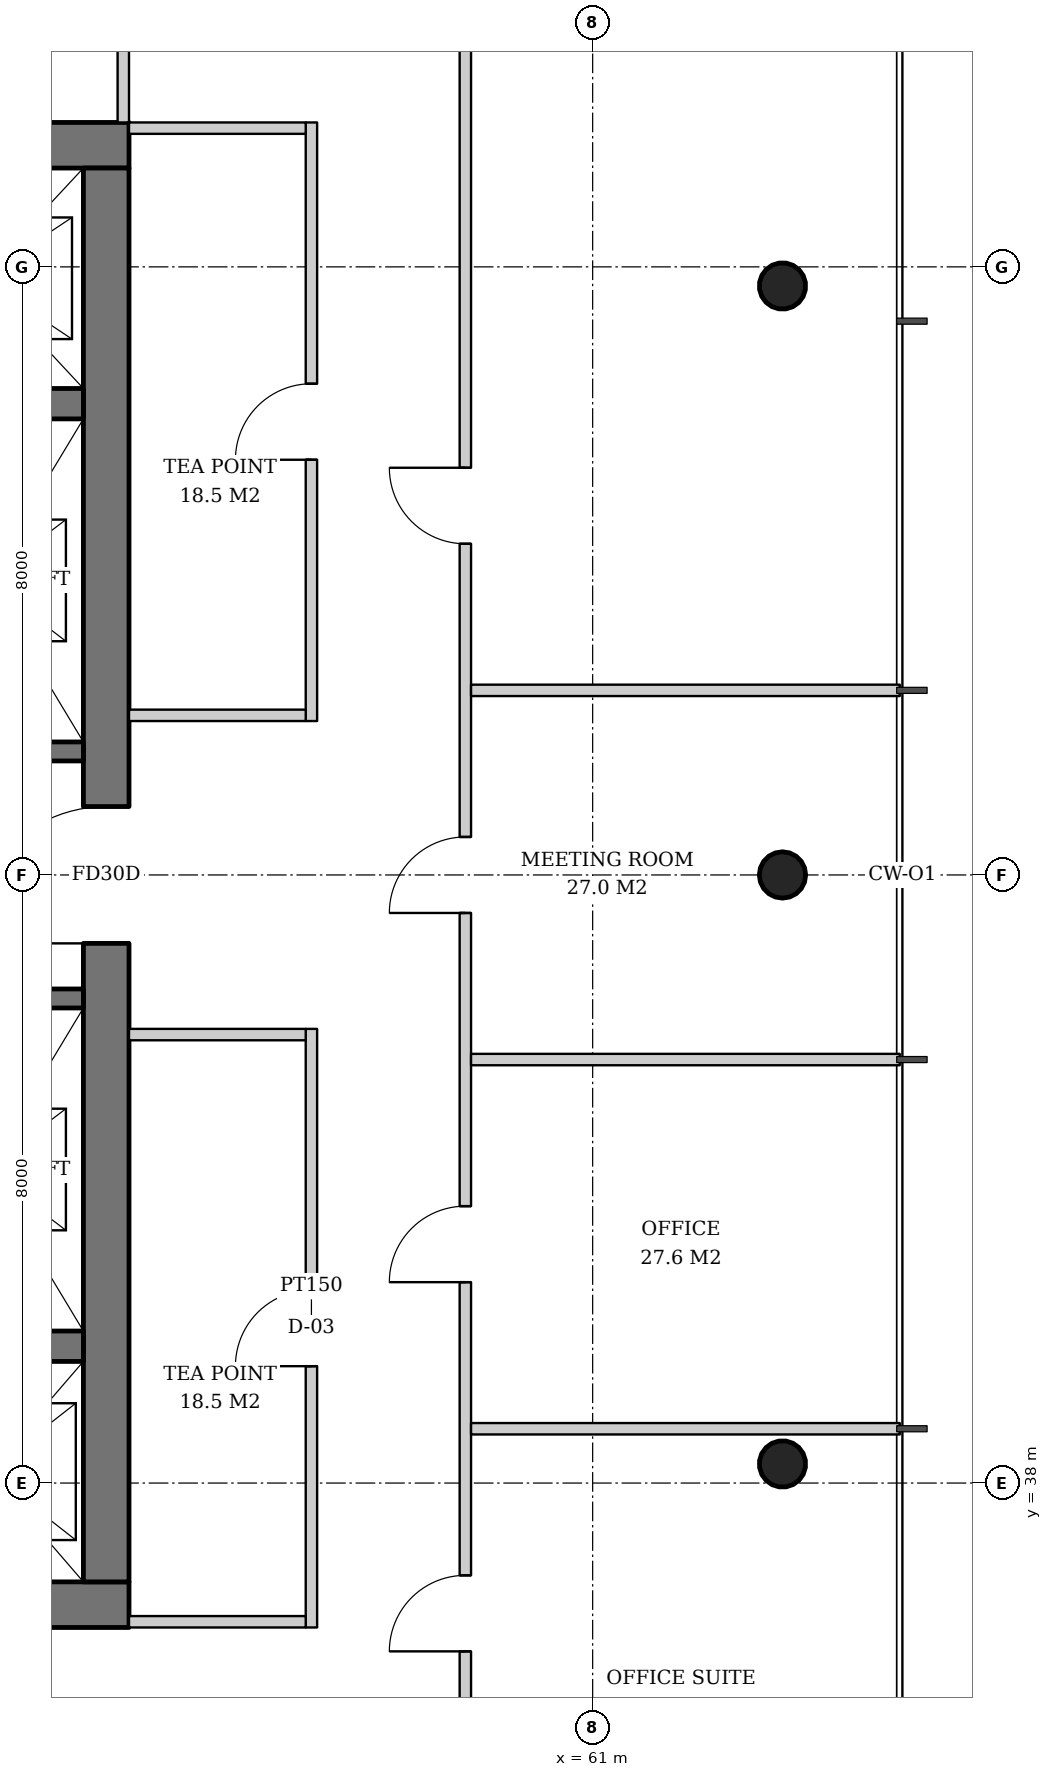
"""IFC4 building model, lengths in metres.
Left out: names, types, materials, properties, quantities, classifications, styles, units other than length and angle.
Written with IfcOpenShell. Run it as: python <this file> out.ifc"""

import sys

from ifc_helpers import new_model, si_unit, direction, frame, frame_2d, origin, origin_2d, place, context, subcontext, project, spatial, rectangle, hollow_circle, extrude, element, fill, save


model = new_model("IFC4")
c1 = context("Model", 3, precision=1e-05, world=origin(), true_north=direction((0.0, 1.0)))
c2 = subcontext(c1, "Body", "Model", "MODEL_VIEW")
j1 = project(units=[si_unit("LENGTHUNIT", "METRE"), si_unit("PLANEANGLEUNIT", "RADIAN")], contexts=[c1])
p1 = place(None, origin())
s1 = spatial("IfcSite", under=j1, at=p1, CompositionType="ELEMENT")
p2 = place(p1, origin())
s2 = spatial("IfcBuilding", under=s1, at=p2, CompositionType="ELEMENT")
p3 = place(p2, frame((0.0, 0.0, 192.0)))
s3 = spatial("IfcBuildingStorey", under=s2, at=p3, CompositionType="ELEMENT", Elevation=192.0)
p4 = place(p3, frame((63.536, 38.232, 0.0), z_axis=(-0.031910269556, 0.015987237665, 0.999362868496), x_axis=(-0.447933021895, -0.894067115991, 0.0)))
e1 = element("IfcColumn", 1, at=p4, inside=s3, PredefinedType="COLUMN", context=c2, shape_type="SweptSolid", body=[
    extrude(hollow_circle(Radius=0.305, WallThickness=0.025, at=origin_2d()), origin(), (0.0, 0.0, 1.0), 3.802),
])
p5 = place(p3, frame((63.536, 46.0, 0.0), z_axis=(-0.031914348339, 0.0, 0.999490607445), x_axis=(0.0, -1.0, 0.0)))
e2 = element("IfcColumn", 2, at=p5, inside=s3, PredefinedType="COLUMN", context=c2, shape_type="SweptSolid", body=[
    extrude(hollow_circle(Radius=0.305, WallThickness=0.025, at=origin_2d()), origin(), (0.0, 0.0, 1.0), 3.802),
])
p6 = place(p3, frame((63.536, 53.768, 0.0), z_axis=(-0.031910269556, -0.015987237665, 0.999362868496), x_axis=(0.447933021895, -0.894067115991, 0.0)))
e3 = element("IfcColumn", 3, at=p6, inside=s3, PredefinedType="COLUMN", context=c2, shape_type="SweptSolid", body=[
    extrude(hollow_circle(Radius=0.305, WallThickness=0.025, at=origin_2d()), origin(), (0.0, 0.0, 1.0), 3.802),
])
p7 = place(p3, frame((35.1, 36.4, 0.0), z_axis=(0.0, 0.0, 1.0), x_axis=(1.0, 0.0, 0.0)))
e4 = element("IfcWall", 4, at=p7, inside=s3, PredefinedType="SHEAR", context=c2, shape_type="SweptSolid", body=[
    extrude(rectangle(XDim=19.8, YDim=0.6, at=frame_2d((9.9, 0.0))), origin(), (0.0, 0.0, 1.0), 3.8),
])
p8 = place(p7, frame((3.9, 0.0, 0.0)))
e5 = element("IfcOpeningElement", 5, at=p8, cuts=e4, PredefinedType="OPENING", context=c2, shape_type="SweptSolid", body=[
    extrude(rectangle(XDim=1.0, YDim=2.1, at=frame_2d((0.5, 1.05))), frame((0.0, 0.31, 0.0), z_axis=(0.0, -1.0, 0.0), x_axis=(1.0, 0.0, 0.0)), (0.0, 0.0, 1.0), 0.62),
])
p9 = place(p7, frame((15.35, 0.0, 0.0)))
e6 = element("IfcOpeningElement", 6, at=p9, cuts=e4, PredefinedType="OPENING", context=c2, shape_type="SweptSolid", body=[
    extrude(rectangle(XDim=1.0, YDim=2.1, at=frame_2d((0.5, 1.05))), frame((0.0, 0.31, 0.0), z_axis=(0.0, -1.0, 0.0), x_axis=(1.0, 0.0, 0.0)), (0.0, 0.0, 1.0), 0.62),
])
p10 = place(p3, frame((35.1, 55.6, 0.0), z_axis=(0.0, 0.0, 1.0), x_axis=(1.0, 0.0, 0.0)))
e7 = element("IfcWall", 7, at=p10, inside=s3, PredefinedType="SHEAR", context=c2, shape_type="SweptSolid", body=[
    extrude(rectangle(XDim=19.8, YDim=0.6, at=frame_2d((9.9, 0.0))), origin(), (0.0, 0.0, 1.0), 3.8),
])
p11 = place(p10, frame((14.54, 0.0, 0.0)))
e8 = element("IfcOpeningElement", 8, at=p11, cuts=e7, PredefinedType="OPENING", context=c2, shape_type="SweptSolid", body=[
    extrude(rectangle(XDim=1.0, YDim=2.1, at=frame_2d((0.5, 1.05))), frame((0.0, 0.31, 0.0), z_axis=(0.0, -1.0, 0.0), x_axis=(1.0, 0.0, 0.0)), (0.0, 0.0, 1.0), 0.62),
])
p12 = place(p10, frame((1.396, 0.0, 0.0)))
e9 = element("IfcOpeningElement", 9, at=p12, cuts=e7, PredefinedType="OPENING", context=c2, shape_type="SweptSolid", body=[
    extrude(rectangle(XDim=1.0, YDim=2.1, at=frame_2d((0.5, 1.05))), frame((0.0, 0.31, 0.0), z_axis=(0.0, -1.0, 0.0), x_axis=(1.0, 0.0, 0.0)), (0.0, 0.0, 1.0), 0.62),
])
p13 = place(p10, frame((3.448, 0.0, 0.0)))
e10 = element("IfcOpeningElement", 10, at=p13, cuts=e7, PredefinedType="OPENING", context=c2, shape_type="SweptSolid", body=[
    extrude(rectangle(XDim=1.0, YDim=2.1, at=frame_2d((0.5, 1.05))), frame((0.0, 0.31, 0.0), z_axis=(0.0, -1.0, 0.0), x_axis=(1.0, 0.0, 0.0)), (0.0, 0.0, 1.0), 0.62),
])
p14 = place(p3, frame((54.6, 36.7, 0.0), z_axis=(0.0, 0.0, 1.0), x_axis=(0.0, 1.0, 0.0)))
e11 = element("IfcWall", 11, at=p14, inside=s3, PredefinedType="SHEAR", context=c2, shape_type="SweptSolid", body=[
    extrude(rectangle(XDim=18.6, YDim=0.6, at=frame_2d((9.3, 0.0))), origin(), (0.0, 0.0, 1.0), 3.8),
])
p15 = place(p14, frame((8.4, 0.0, 0.0)))
e12 = element("IfcOpeningElement", 12, at=p15, cuts=e11, PredefinedType="OPENING", context=c2, shape_type="SweptSolid", body=[
    extrude(rectangle(XDim=1.8, YDim=2.4, at=frame_2d((0.9, 1.2))), frame((0.0, 0.31, 0.0), z_axis=(0.0, -1.0, 0.0), x_axis=(1.0, 0.0, 0.0)), (0.0, 0.0, 1.0), 0.62),
])
for number, where, z_axis, x_axis in (
    (13, (35.7, 39.8, 0.0), (0.0, 0.0, 1.0), (1.0, 0.0, 0.0)),
    (14, (35.7, 52.2, 0.0), (0.0, 0.0, 1.0), (1.0, 0.0, 0.0)),
):
    element("IfcWall", number, at=place(p3, frame(where, z_axis=z_axis, x_axis=x_axis)), inside=s3, PredefinedType="SHEAR", context=c2, shape_type="SweptSolid", body=[
        extrude(rectangle(XDim=18.6, YDim=0.4, at=frame_2d((9.3, 0.0))), origin(), (0.0, 0.0, 1.0), 3.8),
    ])
for number, where, z_axis, x_axis in (
    (15, (48.93, 47.625, 0.0), (0.0, 0.0, 1.0), (1.0, 0.0, 0.0)),
    (16, (48.93, 44.375, 0.0), (0.0, 0.0, 1.0), (1.0, 0.0, 0.0)),
):
    element("IfcWall", number, at=place(p3, frame(where, z_axis=z_axis, x_axis=x_axis)), inside=s3, PredefinedType="SHEAR", context=c2, shape_type="SweptSolid", body=[
        extrude(rectangle(XDim=5.37, YDim=0.25, at=frame_2d((2.685, 0.0))), origin(), (0.0, 0.0, 1.0), 3.8),
    ])
p16 = place(p3, frame((57.3, 36.1, 0.0), z_axis=(0.0, 0.0, 1.0), x_axis=(0.0, 1.0, 0.0)))
e17 = element("IfcWall", 17, at=p16, inside=s3, PredefinedType="PARTITIONING", context=c2, shape_type="SweptSolid", body=[
    extrude(rectangle(XDim=7.875, YDim=0.15, at=frame_2d((3.938, 0.0))), origin(), (0.0, 0.0, 1.0), 2.867),
])
p17 = place(p16, frame((3.438, 0.0, 0.0)))
e18 = element("IfcOpeningElement", 18, at=p17, cuts=e17, PredefinedType="OPENING", context=c2, shape_type="SweptSolid", body=[
    extrude(rectangle(XDim=1.0, YDim=2.1, at=frame_2d((0.5, 1.05))), frame((0.0, 0.085, 0.0), z_axis=(0.0, -1.0, 0.0), x_axis=(1.0, 0.0, 0.0)), (0.0, 0.0, 1.0), 0.17),
])
p18 = place(p3, frame((54.9, 36.175, 0.0), z_axis=(0.0, 0.0, 1.0), x_axis=(1.0, 0.0, 0.0)))
e19 = element("IfcWall", 19, at=p18, inside=s3, PredefinedType="PARTITIONING", context=c2, shape_type="SweptSolid", body=[
    extrude(rectangle(XDim=2.325, YDim=0.15, at=frame_2d((1.163, 0.0))), origin(), (0.0, 0.0, 1.0), 2.867),
])
p19 = place(p3, frame((54.9, 43.9, 0.0), z_axis=(0.0, 0.0, 1.0), x_axis=(1.0, 0.0, 0.0)))
e20 = element("IfcWall", 20, at=p19, inside=s3, PredefinedType="PARTITIONING", context=c2, shape_type="SweptSolid", body=[
    extrude(rectangle(XDim=2.325, YDim=0.15, at=frame_2d((1.163, 0.0))), origin(), (0.0, 0.0, 1.0), 3.62),
])
p20 = place(p3, frame((57.3, 48.025, 0.0), z_axis=(0.0, 0.0, 1.0), x_axis=(0.0, 1.0, 0.0)))
e21 = element("IfcWall", 21, at=p20, inside=s3, PredefinedType="PARTITIONING", context=c2, shape_type="SweptSolid", body=[
    extrude(rectangle(XDim=7.875, YDim=0.15, at=frame_2d((3.938, 0.0))), origin(), (0.0, 0.0, 1.0), 2.867),
])
p21 = place(p20, frame((3.438, 0.0, 0.0)))
e22 = element("IfcOpeningElement", 22, at=p21, cuts=e21, PredefinedType="OPENING", context=c2, shape_type="SweptSolid", body=[
    extrude(rectangle(XDim=1.0, YDim=2.1, at=frame_2d((0.5, 1.05))), frame((0.0, 0.085, 0.0), z_axis=(0.0, -1.0, 0.0), x_axis=(1.0, 0.0, 0.0)), (0.0, 0.0, 1.0), 0.17),
])
for number, where, z_axis, x_axis in (
    (23, (54.9, 48.1, 0.0), (0.0, 0.0, 1.0), (1.0, 0.0, 0.0)),
    (24, (54.9, 55.825, 0.0), (0.0, 0.0, 1.0), (1.0, 0.0, 0.0)),
):
    element("IfcWall", number, at=place(p3, frame(where, z_axis=z_axis, x_axis=x_axis)), inside=s3, PredefinedType="PARTITIONING", context=c2, shape_type="SweptSolid", body=[
        extrude(rectangle(XDim=2.325, YDim=0.15, at=frame_2d((1.163, 0.0))), origin(), (0.0, 0.0, 1.0), 3.62),
    ])
p22 = place(p3, frame((54.825, 55.9, 0.0), z_axis=(0.0, 0.0, 1.0), x_axis=(0.0, 1.0, 0.0)))
e25 = element("IfcWall", 25, at=p22, inside=s3, PredefinedType="PARTITIONING", context=c2, shape_type="SweptSolid", body=[
    extrude(rectangle(XDim=2.325, YDim=0.15, at=frame_2d((1.163, 0.0))), origin(), (0.0, 0.0, 1.0), 2.867),
])
p23 = place(p3, frame((59.325, 33.1, 0.0), z_axis=(0.0, 0.0, 1.0), x_axis=(0.0, 1.0, 0.0)))
e26 = element("IfcWall", 26, at=p23, inside=s3, PredefinedType="PARTITIONING", context=c2, shape_type="SweptSolid", body=[
    extrude(rectangle(XDim=25.8, YDim=0.15, at=frame_2d((12.9, 0.0))), origin(), (0.0, 0.0, 1.0), 2.867),
])
p24 = place(p23, frame((2.686, 0.0, 0.0)))
e27 = element("IfcOpeningElement", 27, at=p24, cuts=e26, PredefinedType="OPENING", context=c2, shape_type="SweptSolid", body=[
    extrude(rectangle(XDim=1.0, YDim=2.1, at=frame_2d((0.5, 1.05))), frame((0.0, 0.085, 0.0), z_axis=(0.0, -1.0, 0.0), x_axis=(1.0, 0.0, 0.0)), (0.0, 0.0, 1.0), 0.17),
])
p25 = place(p23, frame((7.543, 0.0, 0.0)))
e28 = element("IfcOpeningElement", 28, at=p25, cuts=e26, PredefinedType="OPENING", context=c2, shape_type="SweptSolid", body=[
    extrude(rectangle(XDim=1.0, YDim=2.1, at=frame_2d((0.5, 1.05))), frame((0.0, 0.085, 0.0), z_axis=(0.0, -1.0, 0.0), x_axis=(1.0, 0.0, 0.0)), (0.0, 0.0, 1.0), 0.17),
])
p26 = place(p23, frame((12.4, 0.0, 0.0)))
e29 = element("IfcOpeningElement", 29, at=p26, cuts=e26, PredefinedType="OPENING", context=c2, shape_type="SweptSolid", body=[
    extrude(rectangle(XDim=1.0, YDim=2.1, at=frame_2d((0.5, 1.05))), frame((0.0, 0.085, 0.0), z_axis=(0.0, -1.0, 0.0), x_axis=(1.0, 0.0, 0.0)), (0.0, 0.0, 1.0), 0.17),
])
p27 = place(p23, frame((17.257, 0.0, 0.0)))
e30 = element("IfcOpeningElement", 30, at=p27, cuts=e26, PredefinedType="OPENING", context=c2, shape_type="SweptSolid", body=[
    extrude(rectangle(XDim=1.0, YDim=2.1, at=frame_2d((0.5, 1.05))), frame((0.0, 0.085, 0.0), z_axis=(0.0, -1.0, 0.0), x_axis=(1.0, 0.0, 0.0)), (0.0, 0.0, 1.0), 0.17),
])
for number, where, z_axis, x_axis in (
    (31, (59.4, 38.714, 0.0), (0.0, 0.0, 1.0), (1.0, 0.0, 0.0)),
    (32, (59.4, 43.572, 0.0), (0.0, 0.0, 1.0), (1.0, 0.0, 0.0)),
):
    element("IfcWall", number, at=place(p3, frame(where, z_axis=z_axis, x_axis=x_axis)), inside=s3, PredefinedType="PARTITIONING", context=c2, shape_type="SweptSolid", body=[
        extrude(rectangle(XDim=5.64, YDim=0.15, at=frame_2d((2.82, 0.0))), origin(), (0.0, 0.0, 1.0), 3.12),
    ])
p28 = place(p3, frame((59.4, 48.428, 0.0), z_axis=(0.0, 0.0, 1.0), x_axis=(1.0, 0.0, 0.0)))
e33 = element("IfcWall", 33, at=p28, inside=s3, PredefinedType="PARTITIONING", context=c2, shape_type="SweptSolid", body=[
    extrude(rectangle(XDim=5.64, YDim=0.15, at=frame_2d((2.82, 0.0))), origin(), (0.0, 0.0, 1.0), 2.867),
])
p29 = place(p15, origin())
e34 = element("IfcDoor", 34, at=p29, inside=s3, OperationType="DOUBLE_DOOR_SINGLE_SWING", PredefinedType="DOOR", context=c2, shape_type="SweptSolid", body=[
    extrude(rectangle(XDim=1.8, YDim=2.4, at=frame_2d((0.9, 1.2))), frame((0.0, 0.025, 0.0), z_axis=(0.0, -1.0, 0.0), x_axis=(1.0, 0.0, 0.0)), (0.0, 0.0, 1.0), 0.05),
])
fill(e12, e34)
p30 = place(p17, origin())
e35 = element("IfcDoor", 35, at=p30, inside=s3, OperationType="SINGLE_SWING_LEFT", PredefinedType="DOOR", context=c2, shape_type="SweptSolid", body=[
    extrude(rectangle(XDim=1.0, YDim=2.1, at=frame_2d((0.5, 1.05))), frame((0.0, 0.025, 0.0), z_axis=(0.0, -1.0, 0.0), x_axis=(1.0, 0.0, 0.0)), (0.0, 0.0, 1.0), 0.05),
])
fill(e18, e35)
p31 = place(p21, origin())
e36 = element("IfcDoor", 36, at=p31, inside=s3, OperationType="SINGLE_SWING_LEFT", PredefinedType="DOOR", context=c2, shape_type="SweptSolid", body=[
    extrude(rectangle(XDim=1.0, YDim=2.1, at=frame_2d((0.5, 1.05))), frame((0.0, 0.025, 0.0), z_axis=(0.0, -1.0, 0.0), x_axis=(1.0, 0.0, 0.0)), (0.0, 0.0, 1.0), 0.05),
])
fill(e22, e36)
p32 = place(p24, origin())
e37 = element("IfcDoor", 37, at=p32, inside=s3, OperationType="SINGLE_SWING_LEFT", PredefinedType="DOOR", context=c2, shape_type="SweptSolid", body=[
    extrude(rectangle(XDim=1.0, YDim=2.1, at=frame_2d((0.5, 1.05))), frame((0.0, 0.025, 0.0), z_axis=(0.0, -1.0, 0.0), x_axis=(1.0, 0.0, 0.0)), (0.0, 0.0, 1.0), 0.05),
])
fill(e27, e37)
p33 = place(p25, origin())
e38 = element("IfcDoor", 38, at=p33, inside=s3, OperationType="SINGLE_SWING_LEFT", PredefinedType="DOOR", context=c2, shape_type="SweptSolid", body=[
    extrude(rectangle(XDim=1.0, YDim=2.1, at=frame_2d((0.5, 1.05))), frame((0.0, 0.025, 0.0), z_axis=(0.0, -1.0, 0.0), x_axis=(1.0, 0.0, 0.0)), (0.0, 0.0, 1.0), 0.05),
])
fill(e28, e38)
p34 = place(p26, origin())
e39 = element("IfcDoor", 39, at=p34, inside=s3, OperationType="SINGLE_SWING_LEFT", PredefinedType="DOOR", context=c2, shape_type="SweptSolid", body=[
    extrude(rectangle(XDim=1.0, YDim=2.1, at=frame_2d((0.5, 1.05))), frame((0.0, 0.025, 0.0), z_axis=(0.0, -1.0, 0.0), x_axis=(1.0, 0.0, 0.0)), (0.0, 0.0, 1.0), 0.05),
])
fill(e29, e39)
p35 = place(p27, origin())
e40 = element("IfcDoor", 40, at=p35, inside=s3, OperationType="SINGLE_SWING_RIGHT", PredefinedType="DOOR", context=c2, shape_type="SweptSolid", body=[
    extrude(rectangle(XDim=1.0, YDim=2.1, at=frame_2d((0.5, 1.05))), frame((0.0, 0.025, 0.0), z_axis=(0.0, -1.0, 0.0), x_axis=(1.0, 0.0, 0.0)), (0.0, 0.0, 1.0), 0.05),
])
fill(e30, e40)
save(model, sys.argv[1])
